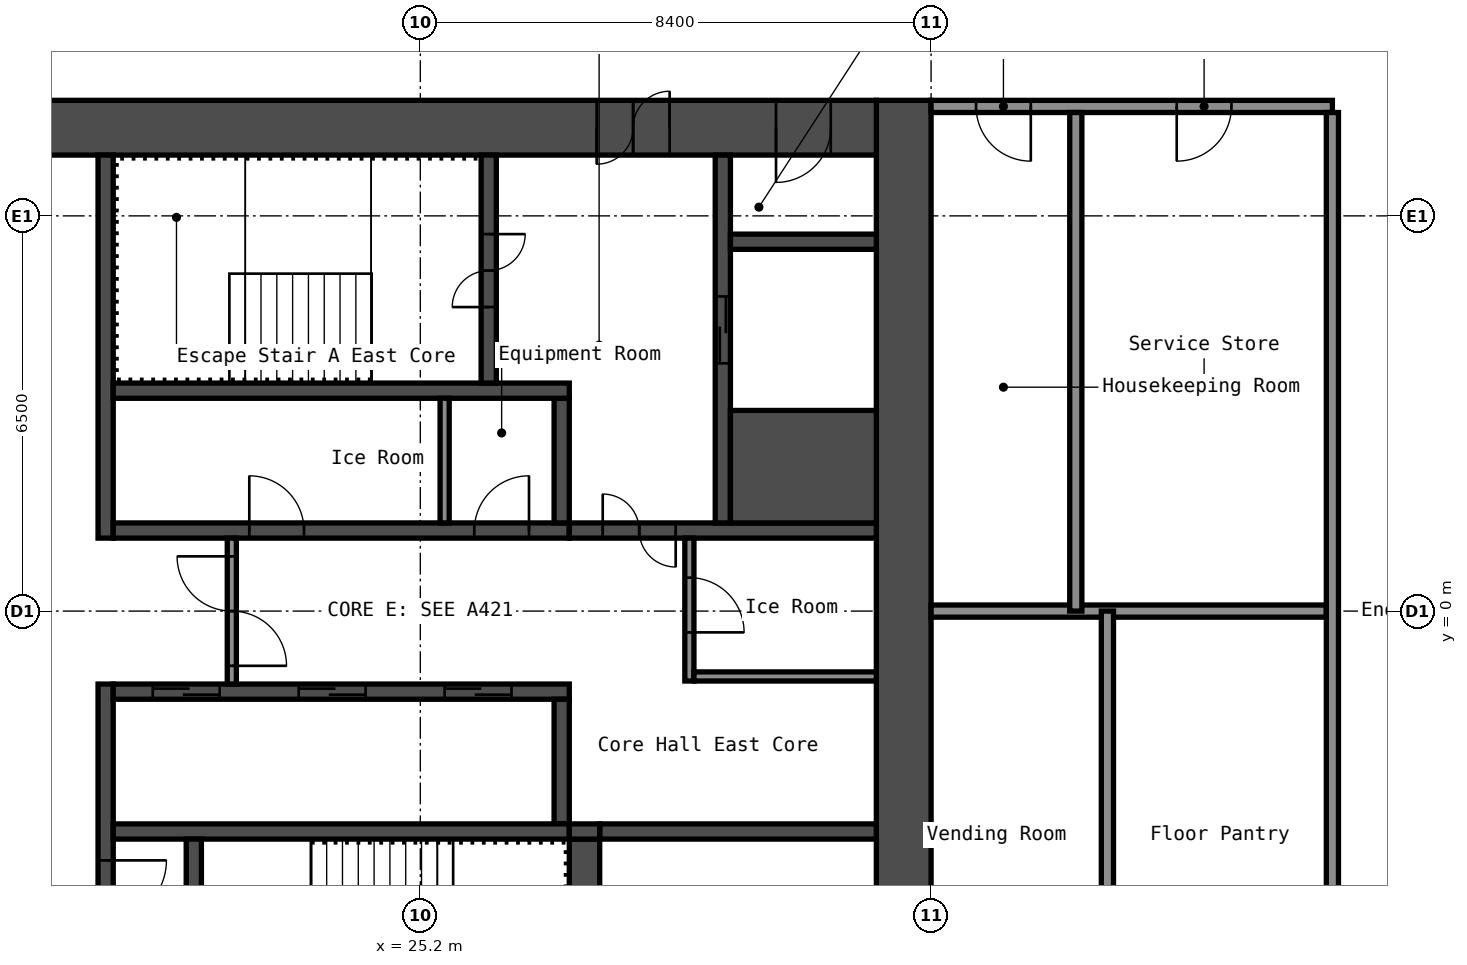
"""IFC4 building model, lengths in metres.
Left out: names, types, materials, properties, quantities, classifications, styles, units other than length and angle.
Written with IfcOpenShell. Run it as: python <this file> out.ifc"""

import sys

from ifc_helpers import new_model, si_unit, direction, frame, frame_2d, origin, place, context, subcontext, project, spatial, rectangle, extrude, element, fill, save


model = new_model("IFC4")
c1 = context("Model", 3, precision=1e-05, world=origin(), true_north=direction((0.0, 1.0)))
c2 = subcontext(c1, "Body", "Model", "MODEL_VIEW")
j1 = project(units=[si_unit("LENGTHUNIT", "METRE"), si_unit("PLANEANGLEUNIT", "RADIAN")], contexts=[c1])
p1 = place(None, origin())
s1 = spatial("IfcSite", under=j1, at=p1, CompositionType="ELEMENT")
p2 = place(p1, origin())
s2 = spatial("IfcBuilding", under=s1, at=p2, CompositionType="ELEMENT")
p3 = place(p2, frame((0.0, 0.0, 140.6)))
s3 = spatial("IfcBuildingStorey", under=s2, at=p3, CompositionType="ELEMENT", Elevation=140.6)
p4 = place(p3, frame((33.15, -8.4, 0.0), z_axis=(0.0, 0.0, 1.0), x_axis=(0.0, 1.0, 0.0)))
e1 = element("IfcWall", 1, at=p4, inside=s3, PredefinedType="SHEAR", context=c2, shape_type="SweptSolid", body=[
    extrude(rectangle(XDim=16.8, YDim=0.9, at=frame_2d((8.4, 0.0))), origin(), (0.0, 0.0, 1.0), 2.75),
])
p5 = place(p3, frame((17.7, 7.95, 0.0), z_axis=(0.0, 0.0, 1.0), x_axis=(1.0, 0.0, 0.0)))
e2 = element("IfcWall", 2, at=p5, inside=s3, PredefinedType="SHEAR", context=c2, shape_type="SweptSolid", body=[
    extrude(rectangle(XDim=15.0, YDim=0.9, at=frame_2d((7.5, 0.0))), origin(), (0.0, 0.0, 1.0), 2.75),
])
p6 = place(p5, frame((10.4, 0.0, 0.0)))
e3 = element("IfcOpeningElement", 3, at=p6, cuts=e2, PredefinedType="OPENING", context=c2, shape_type="SweptSolid", body=[
    extrude(rectangle(XDim=1.2, YDim=2.1, at=frame_2d((0.6, 1.05))), frame((0.0, 0.46, 0.0), z_axis=(0.0, -1.0, 0.0), x_axis=(1.0, 0.0, 0.0)), (0.0, 0.0, 1.0), 0.92),
])
p7 = place(p5, frame((13.35, 0.0, 0.0)))
e4 = element("IfcOpeningElement", 4, at=p7, cuts=e2, PredefinedType="OPENING", context=c2, shape_type="SweptSolid", body=[
    extrude(rectangle(XDim=0.9, YDim=2.1, at=frame_2d((0.45, 1.05))), frame((0.0, 0.46, 0.0), z_axis=(0.0, -1.0, 0.0), x_axis=(1.0, 0.0, 0.0)), (0.0, 0.0, 1.0), 0.92),
])
p8 = place(p3, frame((20.025, 1.2, 0.0), z_axis=(0.0, 0.0, 1.0), x_axis=(0.0, 1.0, 0.0)))
e5 = element("IfcWall", 5, at=p8, inside=s3, PredefinedType="SHEAR", context=c2, shape_type="SweptSolid", body=[
    extrude(rectangle(XDim=6.3, YDim=0.25, at=frame_2d((3.15, 0.0))), origin(), (0.0, 0.0, 1.0), 2.75),
])
p9 = place(p3, frame((20.025, -7.5, 0.0), z_axis=(0.0, 0.0, 1.0), x_axis=(0.0, 1.0, 0.0)))
e6 = element("IfcWall", 6, at=p9, inside=s3, PredefinedType="SHEAR", context=c2, shape_type="SweptSolid", body=[
    extrude(rectangle(XDim=6.3, YDim=0.25, at=frame_2d((3.15, 0.0))), origin(), (0.0, 0.0, 1.0), 2.75),
])
p10 = place(p9, frame((2.4, 0.0, 0.0)))
e7 = element("IfcOpeningElement", 7, at=p10, cuts=e6, PredefinedType="OPENING", context=c2, shape_type="SweptSolid", body=[
    extrude(rectangle(XDim=1.0, YDim=2.1, at=frame_2d((0.5, 1.05))), frame((0.0, 0.135, 0.0), z_axis=(0.0, -1.0, 0.0), x_axis=(1.0, 0.0, 0.0)), (0.0, 0.0, 1.0), 0.27),
])
p11 = place(p3, frame((20.15, 1.325, 0.0), z_axis=(0.0, 0.0, 1.0), x_axis=(1.0, 0.0, 0.0)))
e8 = element("IfcWall", 8, at=p11, inside=s3, PredefinedType="SHEAR", context=c2, shape_type="SweptSolid", body=[
    extrude(rectangle(XDim=7.5, YDim=0.25, at=frame_2d((3.75, 0.0))), origin(), (0.0, 0.0, 1.0), 2.75),
])
p12 = place(p11, frame((2.238, 0.0, 0.0)))
e9 = element("IfcOpeningElement", 9, at=p12, cuts=e8, PredefinedType="OPENING", context=c2, shape_type="SweptSolid", body=[
    extrude(rectangle(XDim=0.9, YDim=2.1, at=frame_2d((0.45, 1.05))), frame((0.0, 0.135, 0.0), z_axis=(0.0, -1.0, 0.0), x_axis=(1.0, 0.0, 0.0)), (0.0, 0.0, 1.0), 0.27),
])
p13 = place(p11, frame((5.938, 0.0, 0.0)))
e10 = element("IfcOpeningElement", 10, at=p13, cuts=e8, PredefinedType="OPENING", context=c2, shape_type="SweptSolid", body=[
    extrude(rectangle(XDim=0.9, YDim=2.1, at=frame_2d((0.45, 1.05))), frame((0.0, 0.135, 0.0), z_axis=(0.0, -1.0, 0.0), x_axis=(1.0, 0.0, 0.0)), (0.0, 0.0, 1.0), 0.27),
])
p14 = place(p3, frame((27.525, 1.45, 0.0), z_axis=(0.0, 0.0, 1.0), x_axis=(0.0, 1.0, 0.0)))
e11 = element("IfcWall", 11, at=p14, inside=s3, PredefinedType="SHEAR", context=c2, shape_type="SweptSolid", body=[
    extrude(rectangle(XDim=2.05, YDim=0.25, at=frame_2d((1.025, 0.0))), origin(), (0.0, 0.0, 1.0), 2.75),
])
p15 = place(p3, frame((20.15, 3.625, 0.0), z_axis=(0.0, 0.0, 1.0), x_axis=(1.0, 0.0, 0.0)))
e12 = element("IfcWall", 12, at=p15, inside=s3, PredefinedType="SHEAR", context=c2, shape_type="SweptSolid", body=[
    extrude(rectangle(XDim=7.5, YDim=0.25, at=frame_2d((3.75, 0.0))), origin(), (0.0, 0.0, 1.0), 2.75),
])
p16 = place(p3, frame((26.325, 3.75, 0.0), z_axis=(0.0, 0.0, 1.0), x_axis=(0.0, 1.0, 0.0)))
e13 = element("IfcWall", 13, at=p16, inside=s3, PredefinedType="SHEAR", context=c2, shape_type="SweptSolid", body=[
    extrude(rectangle(XDim=3.75, YDim=0.25, at=frame_2d((1.875, 0.0))), origin(), (0.0, 0.0, 1.0), 2.75),
])
p17 = place(p16, frame((1.25, 0.0, 0.0)))
e14 = element("IfcOpeningElement", 14, at=p17, cuts=e13, PredefinedType="OPENING", context=c2, shape_type="SweptSolid", body=[
    extrude(rectangle(XDim=1.2, YDim=2.1, at=frame_2d((0.6, 1.05))), frame((0.0, 0.135, 0.0), z_axis=(0.0, -1.0, 0.0), x_axis=(1.0, 0.0, 0.0)), (0.0, 0.0, 1.0), 0.27),
])
p18 = place(p3, frame((27.65, 1.325, 0.0), z_axis=(0.0, 0.0, 1.0), x_axis=(1.0, 0.0, 0.0)))
e15 = element("IfcWall", 15, at=p18, inside=s3, PredefinedType="SHEAR", context=c2, shape_type="SweptSolid", body=[
    extrude(rectangle(XDim=5.05, YDim=0.25, at=frame_2d((2.525, 0.0))), origin(), (0.0, 0.0, 1.0), 2.75),
])
p19 = place(p18, frame((0.55, 0.0, 0.0)))
e16 = element("IfcOpeningElement", 16, at=p19, cuts=e15, PredefinedType="OPENING", context=c2, shape_type="SweptSolid", body=[
    extrude(rectangle(XDim=1.2, YDim=2.1, at=frame_2d((0.6, 1.05))), frame((0.0, 0.135, 0.0), z_axis=(0.0, -1.0, 0.0), x_axis=(1.0, 0.0, 0.0)), (0.0, 0.0, 1.0), 0.27),
])
p20 = place(p3, frame((30.175, 1.45, 0.0), z_axis=(0.0, 0.0, 1.0), x_axis=(0.0, 1.0, 0.0)))
e17 = element("IfcWall", 17, at=p20, inside=s3, PredefinedType="SHEAR", context=c2, shape_type="SweptSolid", body=[
    extrude(rectangle(XDim=6.05, YDim=0.25, at=frame_2d((3.025, 0.0))), origin(), (0.0, 0.0, 1.0), 2.75),
])
p21 = place(p20, frame((2.625, 0.0, 0.0)))
e18 = element("IfcOpeningElement", 18, at=p21, cuts=e17, PredefinedType="OPENING", context=c2, shape_type="SweptSolid", body=[
    extrude(rectangle(XDim=1.1, YDim=2.1, at=frame_2d((0.55, 1.05))), frame((0.0, 0.135, 0.0), z_axis=(0.0, -1.0, 0.0), x_axis=(1.0, 0.0, 0.0)), (0.0, 0.0, 1.0), 0.27),
])
p22 = place(p3, frame((30.3, 2.375, 0.0), z_axis=(0.0, 0.0, 1.0), x_axis=(1.0, 0.0, 0.0)))
e19 = element("IfcWall", 19, at=p22, inside=s3, PredefinedType="SHEAR", context=c2, shape_type="SweptSolid", body=[
    extrude(rectangle(XDim=2.4, YDim=1.85, at=frame_2d((1.2, 0.0))), origin(), (0.0, 0.0, 1.0), 2.75),
])
p23 = place(p3, frame((30.3, 6.075, 0.0), z_axis=(0.0, 0.0, 1.0), x_axis=(1.0, 0.0, 0.0)))
e20 = element("IfcWall", 20, at=p23, inside=s3, PredefinedType="SHEAR", context=c2, shape_type="SweptSolid", body=[
    extrude(rectangle(XDim=2.4, YDim=0.25, at=frame_2d((1.2, 0.0))), origin(), (0.0, 0.0, 1.0), 2.75),
])
p24 = place(p3, frame((20.15, -1.325, 0.0), z_axis=(0.0, 0.0, 1.0), x_axis=(1.0, 0.0, 0.0)))
e21 = element("IfcWall", 21, at=p24, inside=s3, PredefinedType="SHEAR", context=c2, shape_type="SweptSolid", body=[
    extrude(rectangle(XDim=7.5, YDim=0.25, at=frame_2d((3.75, 0.0))), origin(), (0.0, 0.0, 1.0), 2.75),
])
p25 = place(p24, frame((0.65, 0.0, 0.0)))
e22 = element("IfcOpeningElement", 22, at=p25, cuts=e21, PredefinedType="OPENING", context=c2, shape_type="SweptSolid", body=[
    extrude(rectangle(XDim=1.1, YDim=2.1, at=frame_2d((0.55, 1.05))), frame((0.0, 0.135, 0.0), z_axis=(0.0, -1.0, 0.0), x_axis=(1.0, 0.0, 0.0)), (0.0, 0.0, 1.0), 0.27),
])
p26 = place(p24, frame((3.05, 0.0, 0.0)))
e23 = element("IfcOpeningElement", 23, at=p26, cuts=e21, PredefinedType="OPENING", context=c2, shape_type="SweptSolid", body=[
    extrude(rectangle(XDim=1.1, YDim=2.1, at=frame_2d((0.55, 1.05))), frame((0.0, 0.135, 0.0), z_axis=(0.0, -1.0, 0.0), x_axis=(1.0, 0.0, 0.0)), (0.0, 0.0, 1.0), 0.27),
])
p27 = place(p24, frame((5.45, 0.0, 0.0)))
e24 = element("IfcOpeningElement", 24, at=p27, cuts=e21, PredefinedType="OPENING", context=c2, shape_type="SweptSolid", body=[
    extrude(rectangle(XDim=1.1, YDim=2.1, at=frame_2d((0.55, 1.05))), frame((0.0, 0.135, 0.0), z_axis=(0.0, -1.0, 0.0), x_axis=(1.0, 0.0, 0.0)), (0.0, 0.0, 1.0), 0.27),
])
p28 = place(p3, frame((27.525, -3.5, 0.0), z_axis=(0.0, 0.0, 1.0), x_axis=(0.0, 1.0, 0.0)))
e25 = element("IfcWall", 25, at=p28, inside=s3, PredefinedType="SHEAR", context=c2, shape_type="SweptSolid", body=[
    extrude(rectangle(XDim=2.05, YDim=0.25, at=frame_2d((1.025, 0.0))), origin(), (0.0, 0.0, 1.0), 2.75),
])
p29 = place(p3, frame((20.15, -3.625, 0.0), z_axis=(0.0, 0.0, 1.0), x_axis=(1.0, 0.0, 0.0)))
e26 = element("IfcWall", 26, at=p29, inside=s3, PredefinedType="SHEAR", context=c2, shape_type="SweptSolid", body=[
    extrude(rectangle(XDim=7.5, YDim=0.25, at=frame_2d((3.75, 0.0))), origin(), (0.0, 0.0, 1.0), 2.75),
])
p30 = place(p3, frame((21.475, -7.5, 0.0), z_axis=(0.0, 0.0, 1.0), x_axis=(0.0, 1.0, 0.0)))
e27 = element("IfcWall", 27, at=p30, inside=s3, PredefinedType="SHEAR", context=c2, shape_type="SweptSolid", body=[
    extrude(rectangle(XDim=3.75, YDim=0.25, at=frame_2d((1.875, 0.0))), origin(), (0.0, 0.0, 1.0), 2.75),
])
p31 = place(p30, frame((1.3, 0.0, 0.0)))
e28 = element("IfcOpeningElement", 28, at=p31, cuts=e27, PredefinedType="OPENING", context=c2, shape_type="SweptSolid", body=[
    extrude(rectangle(XDim=1.2, YDim=2.1, at=frame_2d((0.6, 1.05))), frame((0.0, 0.135, 0.0), z_axis=(0.0, -1.0, 0.0), x_axis=(1.0, 0.0, 0.0)), (0.0, 0.0, 1.0), 0.27),
])
p32 = place(p3, frame((27.9, -7.5, 0.0), z_axis=(0.0, 0.0, 1.0), x_axis=(0.0, 1.0, 0.0)))
e29 = element("IfcWall", 29, at=p32, inside=s3, PredefinedType="SHEAR", context=c2, shape_type="SweptSolid", body=[
    extrude(rectangle(XDim=3.75, YDim=0.5, at=frame_2d((1.875, 0.0))), origin(), (0.0, 0.0, 1.0), 2.75),
])
p33 = place(p3, frame((28.15, -3.625, 0.0), z_axis=(0.0, 0.0, 1.0), x_axis=(1.0, 0.0, 0.0)))
e30 = element("IfcWall", 30, at=p33, inside=s3, PredefinedType="SHEAR", context=c2, shape_type="SweptSolid", body=[
    extrude(rectangle(XDim=4.55, YDim=0.25, at=frame_2d((2.275, 0.0))), origin(), (0.0, 0.0, 1.0), 2.75),
])
p34 = place(p3, frame((27.65, -3.625, 0.0), z_axis=(0.0, 0.0, 1.0), x_axis=(1.0, 0.0, 0.0)))
e31 = element("IfcWall", 31, at=p34, inside=s3, PredefinedType="SHEAR", context=c2, shape_type="SweptSolid", body=[
    extrude(rectangle(XDim=0.5, YDim=0.25, at=frame_2d((0.25, 0.0))), origin(), (0.0, 0.0, 1.0), 2.75),
])
p35 = place(p3, frame((22.1, -1.2, 0.0), z_axis=(0.0, 0.0, 1.0), x_axis=(0.0, 1.0, 0.0)))
e32 = element("IfcWall", 32, at=p35, inside=s3, PredefinedType="PARTITIONING", context=c2, shape_type="SweptSolid", body=[
    extrude(rectangle(XDim=2.4, YDim=0.15, at=frame_2d((1.2, 0.0))), origin(), (0.0, 0.0, 1.0), 2.75),
])
p36 = place(p35, frame((0.3, 0.0, 0.0)))
e33 = element("IfcOpeningElement", 33, at=p36, cuts=e32, PredefinedType="OPENING", context=c2, shape_type="SweptSolid", body=[
    extrude(rectangle(XDim=1.8, YDim=2.1, at=frame_2d((0.9, 1.05))), frame((0.0, 0.085, 0.0), z_axis=(0.0, -1.0, 0.0), x_axis=(1.0, 0.0, 0.0)), (0.0, 0.0, 1.0), 0.17),
])
p37 = place(p3, frame((29.625, -1.15, 0.0), z_axis=(0.0, 0.0, 1.0), x_axis=(0.0, 1.0, 0.0)))
e34 = element("IfcWall", 34, at=p37, inside=s3, PredefinedType="PARTITIONING", context=c2, shape_type="SweptSolid", body=[
    extrude(rectangle(XDim=2.35, YDim=0.15, at=frame_2d((1.175, 0.0))), origin(), (0.0, 0.0, 1.0), 2.75),
])
p38 = place(p37, frame((0.8, 0.0, 0.0)))
e35 = element("IfcOpeningElement", 35, at=p38, cuts=e34, PredefinedType="OPENING", context=c2, shape_type="SweptSolid", body=[
    extrude(rectangle(XDim=0.9, YDim=2.1, at=frame_2d((0.45, 1.05))), frame((0.0, 0.085, 0.0), z_axis=(0.0, -1.0, 0.0), x_axis=(1.0, 0.0, 0.0)), (0.0, 0.0, 1.0), 0.17),
])
p39 = place(p3, frame((29.7, -1.075, 0.0), z_axis=(0.0, 0.0, 1.0), x_axis=(1.0, 0.0, 0.0)))
e36 = element("IfcWall", 36, at=p39, inside=s3, PredefinedType="PARTITIONING", context=c2, shape_type="SweptSolid", body=[
    extrude(rectangle(XDim=3.0, YDim=0.15, at=frame_2d((1.5, 0.0))), origin(), (0.0, 0.0, 1.0), 2.75),
])
p40 = place(p3, frame((25.6, 1.45, 0.0), z_axis=(0.0, 0.0, 1.0), x_axis=(0.0, 1.0, 0.0)))
e37 = element("IfcWall", 37, at=p40, inside=s3, PredefinedType="PARTITIONING", context=c2, shape_type="SweptSolid", body=[
    extrude(rectangle(XDim=2.05, YDim=0.15, at=frame_2d((1.025, 0.0))), origin(), (0.0, 0.0, 1.0), 2.75),
])
p41 = place(p3, frame((33.6, 0.0, 0.0), z_axis=(0.0, 0.0, 1.0), x_axis=(1.0, 0.0, 0.0)))
e38 = element("IfcWall", 38, at=p41, inside=s3, PredefinedType="PARTITIONING", context=c2, shape_type="SweptSolid", body=[
    extrude(rectangle(XDim=6.5, YDim=0.2, at=frame_2d((3.25, 0.0))), origin(), (0.0, 0.0, 1.0), 2.75),
])
p42 = place(p3, frame((33.6, 8.3, 0.0), z_axis=(0.0, 0.0, 1.0), x_axis=(1.0, 0.0, 0.0)))
e39 = element("IfcWall", 39, at=p42, inside=s3, PredefinedType="PARTITIONING", context=c2, shape_type="SweptSolid", body=[
    extrude(rectangle(XDim=6.6, YDim=0.2, at=frame_2d((3.3, 0.0))), origin(), (0.0, 0.0, 1.0), 2.75),
])
p43 = place(p42, frame((0.74, 0.0, 0.0)))
e40 = element("IfcOpeningElement", 40, at=p43, cuts=e39, PredefinedType="OPENING", context=c2, shape_type="SweptSolid", body=[
    extrude(rectangle(XDim=0.9, YDim=2.1, at=frame_2d((0.45, 1.05))), frame((0.0, 0.11, 0.0), z_axis=(0.0, -1.0, 0.0), x_axis=(1.0, 0.0, 0.0)), (0.0, 0.0, 1.0), 0.22),
])
p44 = place(p42, frame((4.04, 0.0, 0.0)))
e41 = element("IfcOpeningElement", 41, at=p44, cuts=e39, PredefinedType="OPENING", context=c2, shape_type="SweptSolid", body=[
    extrude(rectangle(XDim=0.9, YDim=2.1, at=frame_2d((0.45, 1.05))), frame((0.0, 0.11, 0.0), z_axis=(0.0, -1.0, 0.0), x_axis=(1.0, 0.0, 0.0)), (0.0, 0.0, 1.0), 0.22),
])
for number, where, z_axis, x_axis in (
    (42, (35.98, 0.0, 0.0), (0.0, 0.0, 1.0), (0.0, 1.0, 0.0)),
    (43, (36.5, -8.2, 0.0), (0.0, 0.0, 1.0), (0.0, 1.0, 0.0)),
):
    element("IfcWall", number, at=place(p3, frame(where, z_axis=z_axis, x_axis=x_axis)), inside=s3, PredefinedType="PARTITIONING", context=c2, shape_type="SweptSolid", body=[
        extrude(rectangle(XDim=8.2, YDim=0.2, at=frame_2d((4.1, 0.0))), origin(), (0.0, 0.0, 1.0), 2.75),
    ])
p45 = place(p3, frame((40.2, -8.2, 0.0), z_axis=(0.0, 0.0, 1.0), x_axis=(0.0, 1.0, 0.0)))
e44 = element("IfcWall", 44, at=p45, inside=s3, PredefinedType="PARTITIONING", context=c2, shape_type="SweptSolid", body=[
    extrude(rectangle(XDim=16.4, YDim=0.2, at=frame_2d((8.2, 0.0))), origin(), (0.0, 0.0, 1.0), 2.75),
])
p46 = place(p6, origin())
e45 = element("IfcDoor", 45, at=p46, inside=s3, OperationType="DOUBLE_DOOR_SINGLE_SWING", PredefinedType="DOOR", context=c2, shape_type="SweptSolid", body=[
    extrude(rectangle(XDim=1.2, YDim=2.1, at=frame_2d((0.6, 1.05))), frame((0.0, 0.025, 0.0), z_axis=(0.0, -1.0, 0.0), x_axis=(1.0, 0.0, 0.0)), (0.0, 0.0, 1.0), 0.05),
])
fill(e3, e45)
p47 = place(p7, origin())
e46 = element("IfcDoor", 46, at=p47, inside=s3, OperationType="SINGLE_SWING_LEFT", PredefinedType="DOOR", context=c2, shape_type="SweptSolid", body=[
    extrude(rectangle(XDim=0.9, YDim=2.1, at=frame_2d((0.45, 1.05))), frame((0.0, 0.025, 0.0), z_axis=(0.0, -1.0, 0.0), x_axis=(1.0, 0.0, 0.0)), (0.0, 0.0, 1.0), 0.05),
])
fill(e4, e46)
p48 = place(p17, origin())
e47 = element("IfcDoor", 47, at=p48, inside=s3, OperationType="DOUBLE_DOOR_SINGLE_SWING", PredefinedType="DOOR", context=c2, shape_type="SweptSolid", body=[
    extrude(rectangle(XDim=1.2, YDim=2.1, at=frame_2d((0.6, 1.05))), frame((0.0, 0.025, 0.0), z_axis=(0.0, -1.0, 0.0), x_axis=(1.0, 0.0, 0.0)), (0.0, 0.0, 1.0), 0.05),
])
fill(e14, e47)
p49 = place(p10, origin())
e48 = element("IfcDoor", 48, at=p49, inside=s3, OperationType="SINGLE_SWING_RIGHT", PredefinedType="DOOR", context=c2, shape_type="SweptSolid", body=[
    extrude(rectangle(XDim=1.0, YDim=2.1, at=frame_2d((0.5, 1.05))), frame((0.0, 0.025, 0.0), z_axis=(0.0, -1.0, 0.0), x_axis=(1.0, 0.0, 0.0)), (0.0, 0.0, 1.0), 0.05),
])
fill(e7, e48)
p50 = place(p19, origin())
e49 = element("IfcDoor", 49, at=p50, inside=s3, OperationType="DOUBLE_DOOR_SINGLE_SWING", PredefinedType="DOOR", context=c2, shape_type="SweptSolid", body=[
    extrude(rectangle(XDim=1.2, YDim=2.1, at=frame_2d((0.6, 1.05))), frame((0.0, 0.025, 0.0), z_axis=(0.0, -1.0, 0.0), x_axis=(1.0, 0.0, 0.0)), (0.0, 0.0, 1.0), 0.05),
])
fill(e16, e49)
p51 = place(p36, origin())
e50 = element("IfcDoor", 50, at=p51, inside=s3, OperationType="DOUBLE_DOOR_SINGLE_SWING", PredefinedType="DOOR", context=c2, shape_type="SweptSolid", body=[
    extrude(rectangle(XDim=1.8, YDim=2.1, at=frame_2d((0.9, 1.05))), frame((0.0, 0.025, 0.0), z_axis=(0.0, -1.0, 0.0), x_axis=(1.0, 0.0, 0.0)), (0.0, 0.0, 1.0), 0.05),
])
fill(e33, e50)
p52 = place(p38, origin())
e51 = element("IfcDoor", 51, at=p52, inside=s3, OperationType="SINGLE_SWING_LEFT", PredefinedType="DOOR", context=c2, shape_type="SweptSolid", body=[
    extrude(rectangle(XDim=0.9, YDim=2.1, at=frame_2d((0.45, 1.05))), frame((0.0, 0.025, 0.0), z_axis=(0.0, -1.0, 0.0), x_axis=(1.0, 0.0, 0.0)), (0.0, 0.0, 1.0), 0.05),
])
fill(e35, e51)
p53 = place(p12, origin())
e52 = element("IfcDoor", 52, at=p53, inside=s3, OperationType="SINGLE_SWING_RIGHT", PredefinedType="DOOR", context=c2, shape_type="SweptSolid", body=[
    extrude(rectangle(XDim=0.9, YDim=2.1, at=frame_2d((0.45, 1.05))), frame((0.0, 0.025, 0.0), z_axis=(0.0, -1.0, 0.0), x_axis=(1.0, 0.0, 0.0)), (0.0, 0.0, 1.0), 0.05),
])
fill(e9, e52)
p54 = place(p13, origin())
e53 = element("IfcDoor", 53, at=p54, inside=s3, OperationType="SINGLE_SWING_LEFT", PredefinedType="DOOR", context=c2, shape_type="SweptSolid", body=[
    extrude(rectangle(XDim=0.9, YDim=2.1, at=frame_2d((0.45, 1.05))), frame((0.0, 0.025, 0.0), z_axis=(0.0, -1.0, 0.0), x_axis=(1.0, 0.0, 0.0)), (0.0, 0.0, 1.0), 0.05),
])
fill(e10, e53)
p55 = place(p25, origin())
e54 = element("IfcDoor", 54, at=p55, inside=s3, OperationType="DOUBLE_DOOR_SLIDING", PredefinedType="DOOR", context=c2, shape_type="SweptSolid", body=[
    extrude(rectangle(XDim=1.1, YDim=2.1, at=frame_2d((0.55, 1.05))), frame((0.0, 0.025, 0.0), z_axis=(0.0, -1.0, 0.0), x_axis=(1.0, 0.0, 0.0)), (0.0, 0.0, 1.0), 0.05),
])
fill(e22, e54)
p56 = place(p26, origin())
e55 = element("IfcDoor", 55, at=p56, inside=s3, OperationType="DOUBLE_DOOR_SLIDING", PredefinedType="DOOR", context=c2, shape_type="SweptSolid", body=[
    extrude(rectangle(XDim=1.1, YDim=2.1, at=frame_2d((0.55, 1.05))), frame((0.0, 0.025, 0.0), z_axis=(0.0, -1.0, 0.0), x_axis=(1.0, 0.0, 0.0)), (0.0, 0.0, 1.0), 0.05),
])
fill(e23, e55)
p57 = place(p27, origin())
e56 = element("IfcDoor", 56, at=p57, inside=s3, OperationType="DOUBLE_DOOR_SLIDING", PredefinedType="DOOR", context=c2, shape_type="SweptSolid", body=[
    extrude(rectangle(XDim=1.1, YDim=2.1, at=frame_2d((0.55, 1.05))), frame((0.0, 0.025, 0.0), z_axis=(0.0, -1.0, 0.0), x_axis=(1.0, 0.0, 0.0)), (0.0, 0.0, 1.0), 0.05),
])
fill(e24, e56)
p58 = place(p21, origin())
e57 = element("IfcDoor", 57, at=p58, inside=s3, OperationType="DOUBLE_DOOR_SLIDING", PredefinedType="DOOR", context=c2, shape_type="SweptSolid", body=[
    extrude(rectangle(XDim=1.1, YDim=2.1, at=frame_2d((0.55, 1.05))), frame((0.0, 0.025, 0.0), z_axis=(0.0, -1.0, 0.0), x_axis=(1.0, 0.0, 0.0)), (0.0, 0.0, 1.0), 0.05),
])
fill(e18, e57)
p59 = place(p43, origin())
e58 = element("IfcDoor", 58, at=p59, inside=s3, OperationType="SINGLE_SWING_RIGHT", PredefinedType="DOOR", context=c2, shape_type="SweptSolid", body=[
    extrude(rectangle(XDim=0.9, YDim=2.1, at=frame_2d((0.45, 1.05))), frame((0.0, 0.025, 0.0), z_axis=(0.0, -1.0, 0.0), x_axis=(1.0, 0.0, 0.0)), (0.0, 0.0, 1.0), 0.05),
])
fill(e40, e58)
p60 = place(p44, origin())
e59 = element("IfcDoor", 59, at=p60, inside=s3, OperationType="SINGLE_SWING_LEFT", PredefinedType="DOOR", context=c2, shape_type="SweptSolid", body=[
    extrude(rectangle(XDim=0.9, YDim=2.1, at=frame_2d((0.45, 1.05))), frame((0.0, 0.025, 0.0), z_axis=(0.0, -1.0, 0.0), x_axis=(1.0, 0.0, 0.0)), (0.0, 0.0, 1.0), 0.05),
])
fill(e41, e59)
save(model, sys.argv[1])
